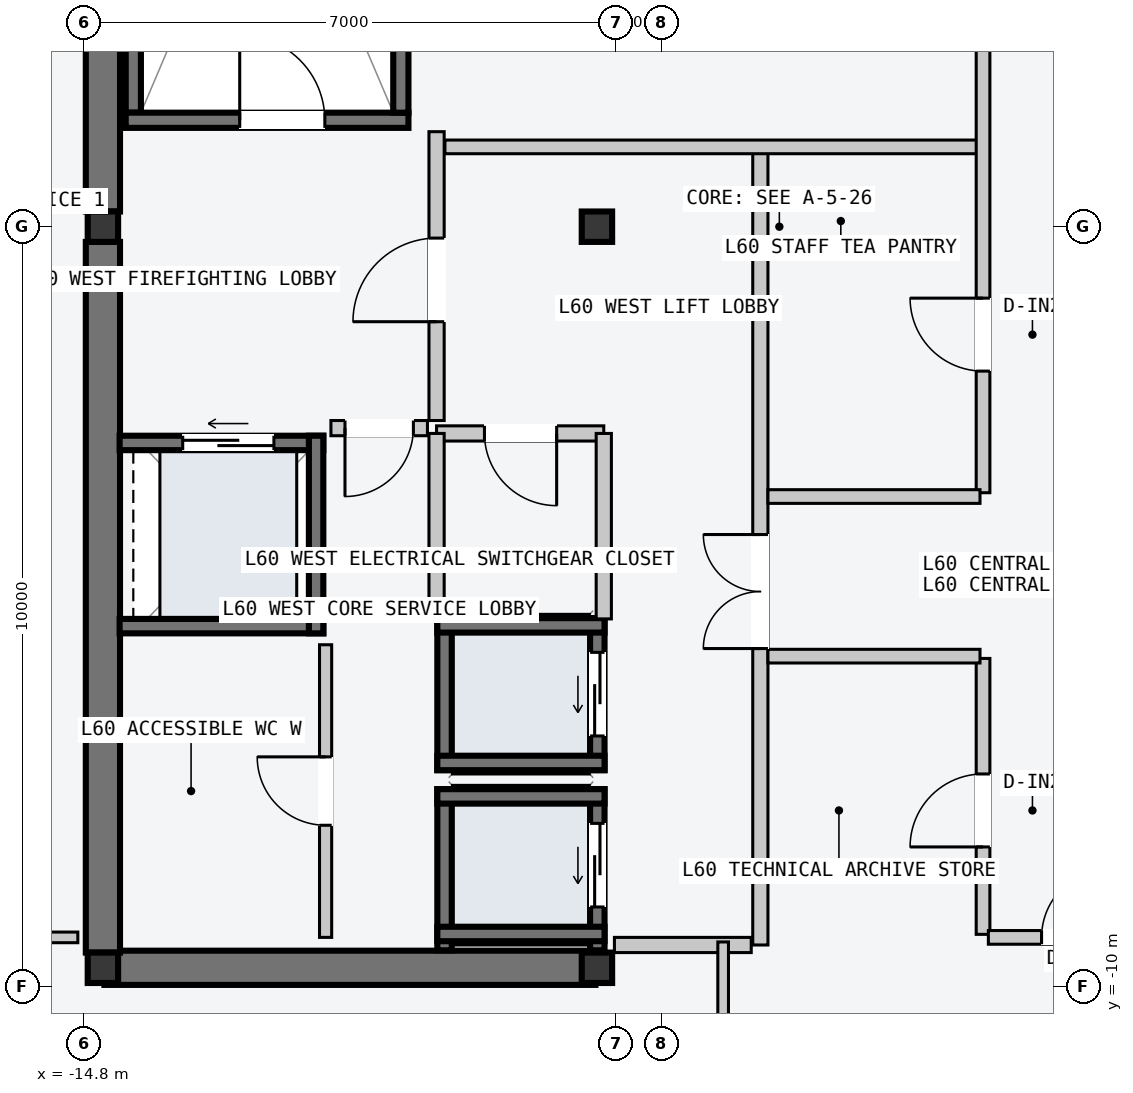
"""IFC4 building model, lengths in metres.
Left out: names, types, materials, properties, quantities, classifications, styles, units other than length and angle.
Written with IfcOpenShell. Run it as: python <this file> out.ifc"""

import sys

from ifc_helpers import new_model, si_unit, direction, frame, frame_2d, origin, origin_2d, place, context, subcontext, project, spatial, rectangle, i_section, extrude, element, fill, save


model = new_model("IFC4")
c1 = context("Model", 3, precision=1e-05, world=origin(), true_north=direction((0.0, 1.0)))
c2 = subcontext(c1, "Body", "Model", "MODEL_VIEW")
j1 = project(units=[si_unit("LENGTHUNIT", "METRE"), si_unit("PLANEANGLEUNIT", "RADIAN")], contexts=[c1])
p1 = place(None, origin())
s1 = spatial("IfcSite", under=j1, at=p1, CompositionType="ELEMENT")
p2 = place(p1, origin())
s2 = spatial("IfcBuilding", under=s1, at=p2, CompositionType="ELEMENT")
p3 = place(p2, frame((0.0, 0.0, 229.2)))
s3 = spatial("IfcBuildingStorey", under=s2, at=p3, CompositionType="ELEMENT", Elevation=229.2)
p4 = place(p3, frame((-14.53, -9.75, -0.2), z_axis=(0.0, 0.0, 1.0), x_axis=(1.0, 0.0, 0.0)))
e1 = element("IfcWall", 1, at=p4, inside=s3, PredefinedType="SHEAR", context=c2, shape_type="SweptSolid", body=[
    extrude(rectangle(XDim=6.46, YDim=0.45, at=frame_2d((3.23, 0.0))), origin(), (0.0, 0.0, 1.0), 3.6),
])
for number, where, z_axis, x_axis in (
    (2, (-14.55, -9.55, -0.2), (0.0, 0.0, 1.0), (0.0, 1.0, 0.0)),
    (3, (-14.55, 0.2, -0.2), (0.0, 0.0, 1.0), (0.0, 1.0, 0.0)),
):
    element("IfcWall", number, at=place(p3, frame(where, z_axis=z_axis, x_axis=x_axis)), inside=s3, PredefinedType="SHEAR", context=c2, shape_type="SweptSolid", body=[
        extrude(rectangle(XDim=9.35, YDim=0.45, at=frame_2d((4.675, 0.0))), origin(), (0.0, 0.0, 1.0), 3.6),
    ])
p5 = place(p3, frame((-14.15, 1.5, -0.2), z_axis=(0.0, 0.0, 1.0), x_axis=(0.0, 1.0, 0.0)))
e4 = element("IfcWall", 4, at=p5, inside=s3, PredefinedType="SOLIDWALL", context=c2, shape_type="SweptSolid", body=[
    extrude(rectangle(XDim=7.8, YDim=0.2, at=frame_2d((3.9, 0.0))), origin(), (0.0, 0.0, 1.0), 3.6),
])
p6 = place(p3, frame((-14.25, 1.4, -0.2), z_axis=(0.0, 0.0, 1.0), x_axis=(1.0, 0.0, 0.0)))
e5 = element("IfcWall", 5, at=p6, inside=s3, PredefinedType="SOLIDWALL", context=c2, shape_type="SweptSolid", body=[
    extrude(rectangle(XDim=3.72, YDim=0.2, at=frame_2d((1.86, 0.0))), origin(), (0.0, 0.0, 1.0), 3.6),
])
p7 = place(p6, frame((1.5, 0.0, 0.2)))
e6 = element("IfcOpeningElement", 6, at=p7, cuts=e5, PredefinedType="OPENING", context=c2, shape_type="SweptSolid", body=[
    extrude(rectangle(XDim=1.12, YDim=2.18, at=frame_2d((0.56, 1.09))), frame((0.0, 0.11, 0.0), z_axis=(0.0, -1.0, 0.0), x_axis=(1.0, 0.0, 0.0)), (0.0, 0.0, 1.0), 0.22),
])
p8 = place(p3, frame((-10.63, 1.5, -0.2), z_axis=(0.0, 0.0, 1.0), x_axis=(0.0, 1.0, 0.0)))
e7 = element("IfcWall", 7, at=p8, inside=s3, PredefinedType="SOLIDWALL", context=c2, shape_type="SweptSolid", body=[
    extrude(rectangle(XDim=7.8, YDim=0.2, at=frame_2d((3.9, 0.0))), origin(), (0.0, 0.0, 1.0), 3.6),
])
for number, where, z_axis, x_axis in (
    (8, (-14.55, -9.75, 0.0), (0.0, 0.0, 1.0), (1.0, 0.0, 0.0)),
    (9, (-14.55, 0.0, 0.0), (0.0, 0.0, 1.0), (1.0, 0.0, 0.0)),
    (10, (-8.05, -9.75, 0.0), (0.0, 0.0, 1.0), (1.0, 0.0, 0.0)),
    (11, (-8.05, 0.0, 0.0), (0.0, 0.0, 1.0), (1.0, 0.0, 0.0)),
):
    element("IfcColumn", number, at=place(p3, frame(where, z_axis=z_axis, x_axis=x_axis)), inside=s3, PredefinedType="COLUMN", context=c2, shape_type="SweptSolid", body=[
        extrude(i_section(OverallWidth=0.4, OverallDepth=0.4, WebThickness=0.013, FlangeThickness=0.021, at=origin_2d()), origin(), (0.0, 0.0, 1.0), 3.6),
    ])
p9 = place(p3, frame((-8.045, -9.52, -0.2), z_axis=(0.0, 0.0, 1.0), x_axis=(0.0, 1.0, 0.0)))
e12 = element("IfcWall", 12, at=p9, inside=s3, PredefinedType="SOLIDWALL", context=c2, shape_type="SweptSolid", body=[
    extrude(rectangle(XDim=2.12, YDim=0.19, at=frame_2d((1.06, 0.0))), origin(), (0.0, 0.0, 1.0), 3.6),
])
p10 = place(p9, frame((0.57, 0.0, 0.2)))
e13 = element("IfcOpeningElement", 13, at=p10, cuts=e12, PredefinedType="OPENING", context=c2, shape_type="SweptSolid", body=[
    extrude(rectangle(XDim=1.1, YDim=2.2, at=frame_2d((0.55, 1.1))), frame((0.0, 0.105, 0.0), z_axis=(0.0, -1.0, 0.0), x_axis=(1.0, 0.0, 0.0)), (0.0, 0.0, 1.0), 0.21),
])
p11 = place(p3, frame((-10.055, -9.52, -0.2), z_axis=(0.0, 0.0, 1.0), x_axis=(0.0, 1.0, 0.0)))
e14 = element("IfcWall", 14, at=p11, inside=s3, PredefinedType="SOLIDWALL", context=c2, shape_type="SweptSolid", body=[
    extrude(rectangle(XDim=2.12, YDim=0.19, at=frame_2d((1.06, 0.0))), origin(), (0.0, 0.0, 1.0), 3.6),
])
for number, where, z_axis, x_axis in (
    (15, (-10.15, -7.495, -0.2), (0.0, 0.0, 1.0), (1.0, 0.0, 0.0)),
    (16, (-10.15, -9.305, -0.2), (0.0, 0.0, 1.0), (1.0, 0.0, 0.0)),
):
    element("IfcWall", number, at=place(p3, frame(where, z_axis=z_axis, x_axis=x_axis)), inside=s3, PredefinedType="SOLIDWALL", context=c2, shape_type="SweptSolid", body=[
        extrude(rectangle(XDim=2.2, YDim=0.19, at=frame_2d((1.1, 0.0))), origin(), (0.0, 0.0, 1.0), 3.6),
    ])
p12 = place(p3, frame((-8.045, -7.15, -0.2), z_axis=(0.0, 0.0, 1.0), x_axis=(0.0, 1.0, 0.0)))
e17 = element("IfcWall", 17, at=p12, inside=s3, PredefinedType="SOLIDWALL", context=c2, shape_type="SweptSolid", body=[
    extrude(rectangle(XDim=2.0, YDim=0.19, at=frame_2d((1.0, 0.0))), origin(), (0.0, 0.0, 1.0), 3.6),
])
p13 = place(p12, frame((0.45, 0.0, 0.2)))
e18 = element("IfcOpeningElement", 18, at=p13, cuts=e17, PredefinedType="OPENING", context=c2, shape_type="SweptSolid", body=[
    extrude(rectangle(XDim=1.1, YDim=2.2, at=frame_2d((0.55, 1.1))), frame((0.0, 0.105, 0.0), z_axis=(0.0, -1.0, 0.0), x_axis=(1.0, 0.0, 0.0)), (0.0, 0.0, 1.0), 0.21),
])
p14 = place(p3, frame((-10.055, -7.15, -0.2), z_axis=(0.0, 0.0, 1.0), x_axis=(0.0, 1.0, 0.0)))
e19 = element("IfcWall", 19, at=p14, inside=s3, PredefinedType="SOLIDWALL", context=c2, shape_type="SweptSolid", body=[
    extrude(rectangle(XDim=2.0, YDim=0.19, at=frame_2d((1.0, 0.0))), origin(), (0.0, 0.0, 1.0), 3.6),
])
for number, where, z_axis, x_axis in (
    (20, (-10.15, -5.245, -0.2), (0.0, 0.0, 1.0), (1.0, 0.0, 0.0)),
    (21, (-10.15, -7.055, -0.2), (0.0, 0.0, 1.0), (1.0, 0.0, 0.0)),
):
    element("IfcWall", number, at=place(p3, frame(where, z_axis=z_axis, x_axis=x_axis)), inside=s3, PredefinedType="SOLIDWALL", context=c2, shape_type="SweptSolid", body=[
        extrude(rectangle(XDim=2.2, YDim=0.19, at=frame_2d((1.1, 0.0))), origin(), (0.0, 0.0, 1.0), 3.6),
    ])
p15 = place(p3, frame((-14.33, -2.845, -0.2), z_axis=(0.0, 0.0, 1.0), x_axis=(1.0, 0.0, 0.0)))
e22 = element("IfcWall", 22, at=p15, inside=s3, PredefinedType="SOLIDWALL", context=c2, shape_type="SweptSolid", body=[
    extrude(rectangle(XDim=2.68, YDim=0.19, at=frame_2d((1.34, 0.0))), origin(), (0.0, 0.0, 1.0), 3.6),
])
p16 = place(p15, frame((0.83, 0.0, 0.2)))
e23 = element("IfcOpeningElement", 23, at=p16, cuts=e22, PredefinedType="OPENING", context=c2, shape_type="SweptSolid", body=[
    extrude(rectangle(XDim=1.2, YDim=2.2, at=frame_2d((0.6, 1.1))), frame((0.0, 0.105, 0.0), z_axis=(0.0, -1.0, 0.0), x_axis=(1.0, 0.0, 0.0)), (0.0, 0.0, 1.0), 0.21),
])
p17 = place(p3, frame((-14.33, -5.255, -0.2), z_axis=(0.0, 0.0, 1.0), x_axis=(1.0, 0.0, 0.0)))
e24 = element("IfcWall", 24, at=p17, inside=s3, PredefinedType="SOLIDWALL", context=c2, shape_type="SweptSolid", body=[
    extrude(rectangle(XDim=2.68, YDim=0.19, at=frame_2d((1.34, 0.0))), origin(), (0.0, 0.0, 1.0), 3.6),
])
p18 = place(p3, frame((-11.745, -5.35, -0.2), z_axis=(0.0, 0.0, 1.0), x_axis=(0.0, 1.0, 0.0)))
e25 = element("IfcWall", 25, at=p18, inside=s3, PredefinedType="SOLIDWALL", context=c2, shape_type="SweptSolid", body=[
    extrude(rectangle(XDim=2.6, YDim=0.19, at=frame_2d((1.3, 0.0))), origin(), (0.0, 0.0, 1.0), 3.6),
])
p19 = place(p3, frame((-5.9, -9.45, 0.0), z_axis=(0.0, 0.0, 1.0), x_axis=(0.0, 1.0, 0.0)))
e26 = element("IfcWall", 26, at=p19, inside=s3, PredefinedType="PARTITIONING", context=c2, shape_type="SweptSolid", body=[
    extrude(rectangle(XDim=10.5, YDim=0.2, at=frame_2d((5.25, 0.0))), origin(), (0.0, 0.0, 1.0), 3.4),
])
p20 = place(p19, frame((3.9, 0.0, 0.0)))
e27 = element("IfcOpeningElement", 27, at=p20, cuts=e26, PredefinedType="OPENING", context=c2, shape_type="SweptSolid", body=[
    extrude(rectangle(XDim=1.5, YDim=2.2, at=frame_2d((0.75, 1.1))), frame((0.0, 0.11, 0.0), z_axis=(0.0, -1.0, 0.0), x_axis=(1.0, 0.0, 0.0)), (0.0, 0.0, 1.0), 0.22),
])
p21 = place(p3, frame((-6.02, -9.45, 0.0), z_axis=(0.0, 0.0, 1.0), x_axis=(-1.0, 0.0, 0.0)))
e28 = element("IfcWall", 28, at=p21, inside=s3, PredefinedType="PARTITIONING", context=c2, shape_type="SweptSolid", body=[
    extrude(rectangle(XDim=1.8, YDim=0.2, at=frame_2d((0.9, 0.0))), origin(), (0.0, 0.0, 1.0), 3.4),
])
p22 = place(p3, frame((-10.16, -2.55, 0.0), z_axis=(0.0, 0.0, 1.0), x_axis=(0.0, 1.0, 0.0)))
e29 = element("IfcWall", 29, at=p22, inside=s3, PredefinedType="PARTITIONING", context=c2, shape_type="SweptSolid", body=[
    extrude(rectangle(XDim=3.8, YDim=0.2, at=frame_2d((1.9, 0.0))), origin(), (0.0, 0.0, 1.0), 3.4),
])
p23 = place(p22, frame((1.3, 0.0, 0.0)))
e30 = element("IfcOpeningElement", 30, at=p23, cuts=e29, PredefinedType="OPENING", context=c2, shape_type="SweptSolid", body=[
    extrude(rectangle(XDim=1.1, YDim=2.15, at=frame_2d((0.55, 1.075))), frame((0.0, 0.11, 0.0), z_axis=(0.0, -1.0, 0.0), x_axis=(1.0, 0.0, 0.0)), (0.0, 0.0, 1.0), 0.22),
])
p24 = place(p3, frame((-10.28, -2.65, 0.0), z_axis=(0.0, 0.0, 1.0), x_axis=(-1.0, 0.0, 0.0)))
e31 = element("IfcWall", 31, at=p24, inside=s3, PredefinedType="PARTITIONING", context=c2, shape_type="SweptSolid", body=[
    extrude(rectangle(XDim=1.27, YDim=0.2, at=frame_2d((0.635, 0.0))), origin(), (0.0, 0.0, 1.0), 3.4),
])
p25 = place(p24, frame((0.185, 0.0, 0.0)))
e32 = element("IfcOpeningElement", 32, at=p25, cuts=e31, PredefinedType="OPENING", context=c2, shape_type="SweptSolid", body=[
    extrude(rectangle(XDim=0.9, YDim=2.15, at=frame_2d((0.45, 1.075))), frame((0.0, 0.11, 0.0), z_axis=(0.0, -1.0, 0.0), x_axis=(1.0, 0.0, 0.0)), (0.0, 0.0, 1.0), 0.22),
])
p26 = place(p3, frame((-7.96, -2.72, 0.0), z_axis=(0.0, 0.0, 1.0), x_axis=(-1.0, 0.0, 0.0)))
e33 = element("IfcWall", 33, at=p26, inside=s3, PredefinedType="PARTITIONING", context=c2, shape_type="SweptSolid", body=[
    extrude(rectangle(XDim=2.2, YDim=0.2, at=frame_2d((1.1, 0.0))), origin(), (0.0, 0.0, 1.0), 3.4),
])
p27 = place(p26, frame((0.62, 0.0, 0.0)))
e34 = element("IfcOpeningElement", 34, at=p27, cuts=e33, PredefinedType="OPENING", context=c2, shape_type="SweptSolid", body=[
    extrude(rectangle(XDim=0.95, YDim=2.1, at=frame_2d((0.475, 1.05))), frame((0.0, 0.11, 0.0), z_axis=(0.0, -1.0, 0.0), x_axis=(1.0, 0.0, 0.0)), (0.0, 0.0, 1.0), 0.22),
])
for number, where, z_axis, x_axis in (
    (35, (-7.96, -5.16, 0.0), (0.0, 0.0, 1.0), (0.0, 1.0, 0.0)),
    (36, (-10.16, -5.16, 0.0), (0.0, 0.0, 1.0), (0.0, 1.0, 0.0)),
):
    element("IfcWall", number, at=place(p3, frame(where, z_axis=z_axis, x_axis=x_axis)), inside=s3, PredefinedType="PARTITIONING", context=c2, shape_type="SweptSolid", body=[
        extrude(rectangle(XDim=2.44, YDim=0.2, at=frame_2d((1.22, 0.0))), origin(), (0.0, 0.0, 1.0), 3.4),
    ])
p28 = place(p3, frame((-11.62, -9.35, 0.0), z_axis=(0.0, 0.0, 1.0), x_axis=(0.0, 1.0, 0.0)))
e37 = element("IfcWall", 37, at=p28, inside=s3, PredefinedType="PARTITIONING", context=c2, shape_type="SweptSolid", body=[
    extrude(rectangle(XDim=3.85, YDim=0.16, at=frame_2d((1.925, 0.0))), origin(), (0.0, 0.0, 1.0), 3.4),
])
p29 = place(p28, frame((1.475, 0.0, 0.0)))
e38 = element("IfcOpeningElement", 38, at=p29, cuts=e37, PredefinedType="OPENING", context=c2, shape_type="SweptSolid", body=[
    extrude(rectangle(XDim=0.9, YDim=2.15, at=frame_2d((0.45, 1.075))), frame((0.0, 0.09, 0.0), z_axis=(0.0, -1.0, 0.0), x_axis=(1.0, 0.0, 0.0)), (0.0, 0.0, 1.0), 0.18),
])
p30 = place(p3, frame((-10.05, 1.05, 0.0), z_axis=(0.0, 0.0, 1.0), x_axis=(1.0, 0.0, 0.0)))
e39 = element("IfcWall", 39, at=p30, inside=s3, PredefinedType="PARTITIONING", context=c2, shape_type="SweptSolid", body=[
    extrude(rectangle(XDim=7.04, YDim=0.18, at=frame_2d((3.52, 0.0))), origin(), (0.0, 0.0, 1.0), 3.4),
])
p31 = place(p3, frame((-2.97, -3.5, 0.0), z_axis=(0.0, 0.0, 1.0), x_axis=(0.0, 1.0, 0.0)))
e40 = element("IfcWall", 40, at=p31, inside=s3, PredefinedType="PARTITIONING", context=c2, shape_type="SweptSolid", body=[
    extrude(rectangle(XDim=13.67, YDim=0.18, at=frame_2d((6.835, 0.0))), origin(), (0.0, 0.0, 1.0), 3.4),
])
p32 = place(p31, frame((6.1, 0.0, 0.0)))
e41 = element("IfcOpeningElement", 41, at=p32, cuts=e40, PredefinedType="OPENING", context=c2, shape_type="SweptSolid", body=[
    extrude(rectangle(XDim=1.24, YDim=2.24, at=frame_2d((0.62, 1.12))), frame((0.0, 0.1, 0.0), z_axis=(0.0, -1.0, 0.0), x_axis=(1.0, 0.0, 0.0)), (0.0, 0.0, 1.0), 0.2),
])
p33 = place(p31, frame((1.6, 0.0, 0.0)))
e42 = element("IfcOpeningElement", 42, at=p33, cuts=e40, PredefinedType="OPENING", context=c2, shape_type="SweptSolid", body=[
    extrude(rectangle(XDim=0.96, YDim=2.18, at=frame_2d((0.48, 1.09))), frame((0.0, 0.1, 0.0), z_axis=(0.0, -1.0, 0.0), x_axis=(1.0, 0.0, 0.0)), (0.0, 0.0, 1.0), 0.2),
])
p34 = place(p3, frame((-5.8, -3.55, 0.0), z_axis=(0.0, 0.0, 1.0), x_axis=(1.0, 0.0, 0.0)))
e43 = element("IfcWall", 43, at=p34, inside=s3, PredefinedType="PARTITIONING", context=c2, shape_type="SweptSolid", body=[
    extrude(rectangle(XDim=2.79, YDim=0.18, at=frame_2d((1.395, 0.0))), origin(), (0.0, 0.0, 1.0), 3.4),
])
p35 = place(p3, frame((-2.97, -9.31, 0.0), z_axis=(0.0, 0.0, 1.0), x_axis=(0.0, 1.0, 0.0)))
e44 = element("IfcWall", 44, at=p35, inside=s3, PredefinedType="PARTITIONING", context=c2, shape_type="SweptSolid", body=[
    extrude(rectangle(XDim=3.63, YDim=0.18, at=frame_2d((1.815, 0.0))), origin(), (0.0, 0.0, 1.0), 3.4),
])
p36 = place(p35, frame((1.15, 0.0, 0.0)))
e45 = element("IfcOpeningElement", 45, at=p36, cuts=e44, PredefinedType="OPENING", context=c2, shape_type="SweptSolid", body=[
    extrude(rectangle(XDim=0.96, YDim=2.18, at=frame_2d((0.48, 1.09))), frame((0.0, 0.1, 0.0), z_axis=(0.0, -1.0, 0.0), x_axis=(1.0, 0.0, 0.0)), (0.0, 0.0, 1.0), 0.2),
])
p37 = place(p3, frame((-5.8, -5.65, 0.0), z_axis=(0.0, 0.0, 1.0), x_axis=(1.0, 0.0, 0.0)))
e46 = element("IfcWall", 46, at=p37, inside=s3, PredefinedType="PARTITIONING", context=c2, shape_type="SweptSolid", body=[
    extrude(rectangle(XDim=2.79, YDim=0.18, at=frame_2d((1.395, 0.0))), origin(), (0.0, 0.0, 1.0), 3.4),
])
p38 = place(p3, frame((-6.39, -17.56, 0.0), z_axis=(0.0, 0.0, 1.0), x_axis=(0.0, 1.0, 0.0)))
e47 = element("IfcWall", 47, at=p38, inside=s3, PredefinedType="PARTITIONING", context=c2, shape_type="SweptSolid", body=[
    extrude(rectangle(XDim=8.15, YDim=0.14, at=frame_2d((4.075, 0.0))), origin(), (0.0, 0.0, 1.0), 3.4),
])
p39 = place(p38, frame((1.05, 0.0, 0.0)))
e48 = element("IfcOpeningElement", 48, at=p39, cuts=e47, PredefinedType="OPENING", context=c2, shape_type="SweptSolid", body=[
    extrude(rectangle(XDim=0.96, YDim=2.18, at=frame_2d((0.48, 1.09))), frame((0.0, 0.08, 0.0), z_axis=(0.0, -1.0, 0.0), x_axis=(1.0, 0.0, 0.0)), (0.0, 0.0, 1.0), 0.16),
])
p40 = place(p3, frame((-2.9, -9.35, 0.0), z_axis=(0.0, 0.0, 1.0), x_axis=(1.0, 0.0, 0.0)))
e49 = element("IfcWall", 49, at=p40, inside=s3, PredefinedType="PARTITIONING", context=c2, shape_type="SweptSolid", body=[
    extrude(rectangle(XDim=2.3, YDim=0.18, at=frame_2d((1.15, 0.0))), origin(), (0.0, 0.0, 1.0), 3.4),
])
p41 = place(p40, frame((0.7, 0.0, 0.0)))
e50 = element("IfcOpeningElement", 50, at=p41, cuts=e49, PredefinedType="OPENING", context=c2, shape_type="SweptSolid", body=[
    extrude(rectangle(XDim=0.9, YDim=2.15, at=frame_2d((0.45, 1.075))), frame((0.0, 0.1, 0.0), z_axis=(0.0, -1.0, 0.0), x_axis=(1.0, 0.0, 0.0)), (0.0, 0.0, 1.0), 0.2),
])
p42 = place(p3, frame((-18.56, -9.35, 0.0), z_axis=(0.0, 0.0, 1.0), x_axis=(1.0, 0.0, 0.0)))
e51 = element("IfcWall", 51, at=p42, inside=s3, PredefinedType="PARTITIONING", context=c2, shape_type="SweptSolid", body=[
    extrude(rectangle(XDim=3.68, YDim=0.14, at=frame_2d((1.84, 0.0))), origin(), (0.0, 0.0, 1.0), 3.4),
])
p43 = place(p42, frame((1.36, 0.0, 0.0)))
e52 = element("IfcOpeningElement", 52, at=p43, cuts=e51, PredefinedType="OPENING", context=c2, shape_type="SweptSolid", body=[
    extrude(rectangle(XDim=0.96, YDim=2.18, at=frame_2d((0.48, 1.09))), frame((0.0, 0.08, 0.0), z_axis=(0.0, -1.0, 0.0), x_axis=(1.0, 0.0, 0.0)), (0.0, 0.0, 1.0), 0.16),
])
p44 = place(p7, origin())
e53 = element("IfcDoor", 53, at=p44, inside=s3, OperationType="SINGLE_SWING_LEFT", PredefinedType="DOOR", context=c2, shape_type="SweptSolid", body=[
    extrude(rectangle(XDim=1.12, YDim=2.18, at=frame_2d((0.56, 1.09))), frame((0.0, 0.025, 0.0), z_axis=(0.0, -1.0, 0.0), x_axis=(1.0, 0.0, 0.0)), (0.0, 0.0, 1.0), 0.05),
])
fill(e6, e53)
p45 = place(p10, origin())
e54 = element("IfcDoor", 54, at=p45, inside=s3, OperationType="SLIDING_TO_LEFT", PredefinedType="DOOR", context=c2, shape_type="SweptSolid", body=[
    extrude(rectangle(XDim=1.1, YDim=2.2, at=frame_2d((0.55, 1.1))), frame((0.0, 0.025, 0.0), z_axis=(0.0, -1.0, 0.0), x_axis=(1.0, 0.0, 0.0)), (0.0, 0.0, 1.0), 0.05),
])
fill(e13, e54)
p46 = place(p13, origin())
e55 = element("IfcDoor", 55, at=p46, inside=s3, OperationType="SLIDING_TO_LEFT", PredefinedType="DOOR", context=c2, shape_type="SweptSolid", body=[
    extrude(rectangle(XDim=1.1, YDim=2.2, at=frame_2d((0.55, 1.1))), frame((0.0, 0.025, 0.0), z_axis=(0.0, -1.0, 0.0), x_axis=(1.0, 0.0, 0.0)), (0.0, 0.0, 1.0), 0.05),
])
fill(e18, e55)
p47 = place(p16, origin())
e56 = element("IfcDoor", 56, at=p47, inside=s3, OperationType="SLIDING_TO_LEFT", PredefinedType="DOOR", context=c2, shape_type="SweptSolid", body=[
    extrude(rectangle(XDim=1.2, YDim=2.2, at=frame_2d((0.6, 1.1))), frame((0.0, 0.025, 0.0), z_axis=(0.0, -1.0, 0.0), x_axis=(1.0, 0.0, 0.0)), (0.0, 0.0, 1.0), 0.05),
])
fill(e23, e56)
p48 = place(p20, origin())
e57 = element("IfcDoor", 57, at=p48, inside=s3, OperationType="DOUBLE_DOOR_SINGLE_SWING", PredefinedType="DOOR", context=c2, shape_type="SweptSolid", body=[
    extrude(rectangle(XDim=1.5, YDim=2.2, at=frame_2d((0.75, 1.1))), frame((0.0, 0.025, 0.0), z_axis=(0.0, -1.0, 0.0), x_axis=(1.0, 0.0, 0.0)), (0.0, 0.0, 1.0), 0.05),
])
fill(e27, e57)
p49 = place(p23, origin())
e58 = element("IfcDoor", 58, at=p49, inside=s3, OperationType="SINGLE_SWING_LEFT", PredefinedType="DOOR", context=c2, shape_type="SweptSolid", body=[
    extrude(rectangle(XDim=1.1, YDim=2.15, at=frame_2d((0.55, 1.075))), frame((0.0, 0.025, 0.0), z_axis=(0.0, -1.0, 0.0), x_axis=(1.0, 0.0, 0.0)), (0.0, 0.0, 1.0), 0.05),
])
fill(e30, e58)
p50 = place(p25, origin())
e59 = element("IfcDoor", 59, at=p50, inside=s3, OperationType="SINGLE_SWING_RIGHT", PredefinedType="DOOR", context=c2, shape_type="SweptSolid", body=[
    extrude(rectangle(XDim=0.9, YDim=2.15, at=frame_2d((0.45, 1.075))), frame((0.0, 0.025, 0.0), z_axis=(0.0, -1.0, 0.0), x_axis=(1.0, 0.0, 0.0)), (0.0, 0.0, 1.0), 0.05),
])
fill(e32, e59)
p51 = place(p27, origin())
e60 = element("IfcDoor", 60, at=p51, inside=s3, OperationType="SINGLE_SWING_LEFT", PredefinedType="DOOR", context=c2, shape_type="SweptSolid", body=[
    extrude(rectangle(XDim=0.95, YDim=2.1, at=frame_2d((0.475, 1.05))), frame((0.0, 0.025, 0.0), z_axis=(0.0, -1.0, 0.0), x_axis=(1.0, 0.0, 0.0)), (0.0, 0.0, 1.0), 0.05),
])
fill(e34, e60)
p52 = place(p29, origin())
e61 = element("IfcDoor", 61, at=p52, inside=s3, OperationType="SINGLE_SWING_RIGHT", PredefinedType="DOOR", context=c2, shape_type="SweptSolid", body=[
    extrude(rectangle(XDim=0.9, YDim=2.15, at=frame_2d((0.45, 1.075))), frame((0.0, 0.025, 0.0), z_axis=(0.0, -1.0, 0.0), x_axis=(1.0, 0.0, 0.0)), (0.0, 0.0, 1.0), 0.05),
])
fill(e38, e61)
p53 = place(p33, origin())
e62 = element("IfcDoor", 62, at=p53, inside=s3, OperationType="SINGLE_SWING_RIGHT", PredefinedType="DOOR", context=c2, shape_type="SweptSolid", body=[
    extrude(rectangle(XDim=0.96, YDim=2.18, at=frame_2d((0.48, 1.09))), frame((0.0, 0.025, 0.0), z_axis=(0.0, -1.0, 0.0), x_axis=(1.0, 0.0, 0.0)), (0.0, 0.0, 1.0), 0.05),
])
fill(e42, e62)
p54 = place(p36, origin())
e63 = element("IfcDoor", 63, at=p54, inside=s3, OperationType="SINGLE_SWING_LEFT", PredefinedType="DOOR", context=c2, shape_type="SweptSolid", body=[
    extrude(rectangle(XDim=0.96, YDim=2.18, at=frame_2d((0.48, 1.09))), frame((0.0, 0.025, 0.0), z_axis=(0.0, -1.0, 0.0), x_axis=(1.0, 0.0, 0.0)), (0.0, 0.0, 1.0), 0.05),
])
fill(e45, e63)
p55 = place(p41, origin())
e64 = element("IfcDoor", 64, at=p55, inside=s3, OperationType="SINGLE_SWING_RIGHT", PredefinedType="DOOR", context=c2, shape_type="SweptSolid", body=[
    extrude(rectangle(XDim=0.9, YDim=2.15, at=frame_2d((0.45, 1.075))), frame((0.0, 0.025, 0.0), z_axis=(0.0, -1.0, 0.0), x_axis=(1.0, 0.0, 0.0)), (0.0, 0.0, 1.0), 0.05),
])
fill(e50, e64)
save(model, sys.argv[1])
